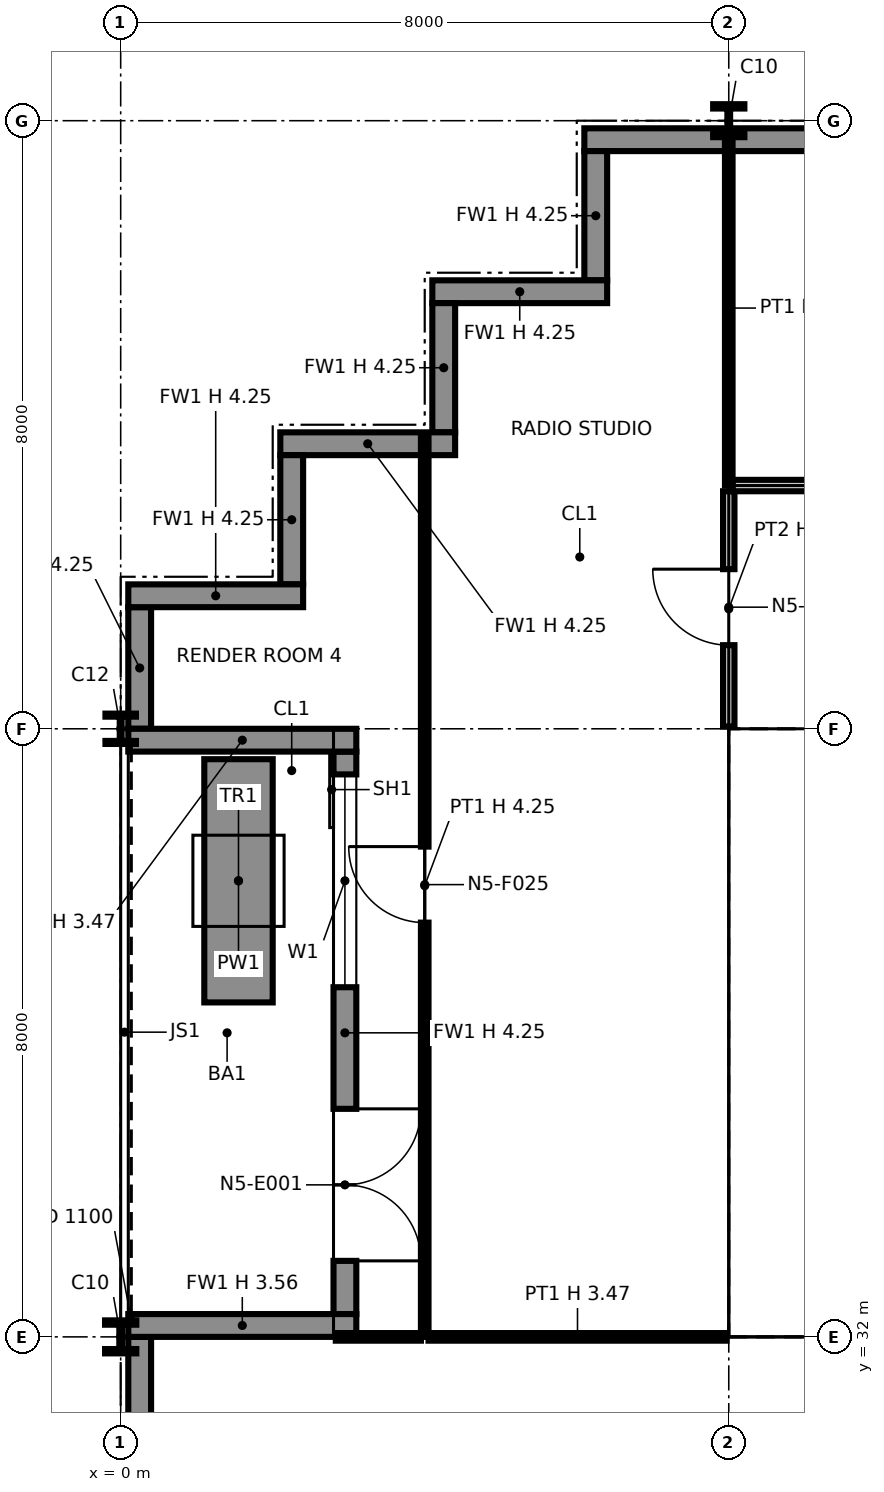
"""IFC4 building model, lengths in metres.
Left out: names, types, materials, properties, quantities, classifications, styles, units other than length and angle.
Written with IfcOpenShell. Run it as: python <this file> out.ifc"""

import sys

from ifc_helpers import new_model, si_unit, direction, frame, frame_2d, origin, origin_2d, place, context, subcontext, project, spatial, polyline, rectangle, i_section, outline, extrude, element, fill, save


model = new_model("IFC4")
c1 = context("Model", 3, precision=1e-05, world=origin(), true_north=direction((0.0, 1.0)))
c2 = subcontext(c1, "Body", "Model", "MODEL_VIEW")
j1 = project(units=[si_unit("LENGTHUNIT", "METRE"), si_unit("PLANEANGLEUNIT", "RADIAN")], contexts=[c1])
p1 = place(None, origin())
s1 = spatial("IfcSite", under=j1, at=p1, CompositionType="ELEMENT")
p2 = place(p1, origin())
s2 = spatial("IfcBuilding", under=s1, at=p2, CompositionType="ELEMENT")
p3 = place(p2, frame((0.0, 0.0, 87.6)))
s3 = spatial("IfcBuildingStorey", under=s2, at=p3, CompositionType="ELEMENT", Elevation=87.6)
p4 = place(p3, frame((0.0, 32.0, 0.0), z_axis=(0.0, 0.0, 1.0), x_axis=(1.0, 0.0, 0.0)))
e1 = element("IfcColumn", 1, at=p4, inside=s3, PredefinedType="COLUMN", context=c2, shape_type="SweptSolid", body=[
    extrude(i_section(OverallWidth=0.411, OverallDepth=0.434, WebThickness=0.036, FlangeThickness=0.057, at=origin_2d()), origin(), (0.0, 0.0, 1.0), 4.25),
])
p5 = place(p3, frame((0.0, 40.0, 0.0), z_axis=(0.0, 0.0, 1.0), x_axis=(1.0, 0.0, 0.0)))
e2 = element("IfcColumn", 2, at=p5, inside=s3, PredefinedType="COLUMN", context=c2, shape_type="SweptSolid", body=[
    extrude(i_section(OverallWidth=0.401, OverallDepth=0.399, WebThickness=0.025, FlangeThickness=0.04, at=origin_2d()), origin(), (0.0, 0.0, 1.0), 4.25),
])
for number, where, z_axis, x_axis in (
    (3, (8.0, 32.0, 0.0), (0.0, 0.0, 1.0), (1.0, 0.0, 0.0)),
    (4, (8.0, 40.0, 0.0), (0.0, 0.0, 1.0), (1.0, 0.0, 0.0)),
):
    element("IfcColumn", number, at=place(p3, frame(where, z_axis=z_axis, x_axis=x_axis)), inside=s3, PredefinedType="COLUMN", context=c2, shape_type="SweptSolid", body=[
        extrude(i_section(OverallWidth=0.394, OverallDepth=0.376, WebThickness=0.017, FlangeThickness=0.028, at=origin_2d()), origin(), (0.0, 0.0, 1.0), 4.25),
    ])
p6 = place(p3, frame((8.0, 48.0, 0.0), z_axis=(0.0, 0.0, 1.0), x_axis=(1.0, 0.0, 0.0)))
e5 = element("IfcColumn", 5, at=p6, inside=s3, PredefinedType="COLUMN", context=c2, shape_type="SweptSolid", body=[
    extrude(i_section(OverallWidth=0.411, OverallDepth=0.434, WebThickness=0.036, FlangeThickness=0.057, at=origin_2d()), origin(), (0.0, 0.0, 1.0), 4.25),
])
p7 = place(p3, frame((0.25, 41.6, 0.0), z_axis=(0.0, 0.0, 1.0), x_axis=(0.0, -1.0, 0.0)))
e6 = element("IfcWall", 6, at=p7, inside=s3, PredefinedType="SOLIDWALL", context=c2, shape_type="SweptSolid", body=[
    extrude(rectangle(XDim=1.6, YDim=0.3, at=frame_2d((0.8, 0.0))), origin(), (0.0, 0.0, 1.0), 4.25),
])
p8 = place(p3, frame((2.95, 39.7, 0.0), z_axis=(0.0, 0.0, 1.0), x_axis=(0.0, -1.0, 0.0)))
e7 = element("IfcWall", 7, at=p8, inside=s3, PredefinedType="SOLIDWALL", context=c2, shape_type="SweptSolid", body=[
    extrude(rectangle(XDim=7.4, YDim=0.3, at=frame_2d((3.7, 0.0))), origin(), (0.0, 0.0, 1.0), 4.25),
])
p9 = place(p8, frame((0.3, 0.0, 0.9)))
e8 = element("IfcOpeningElement", 8, at=p9, cuts=e7, PredefinedType="OPENING", context=c2, shape_type="SweptSolid", body=[
    extrude(rectangle(XDim=2.8, YDim=2.2, at=frame_2d((1.4, 1.1))), frame((0.0, 0.16, 0.0), z_axis=(0.0, -1.0, 0.0), x_axis=(1.0, 0.0, 0.0)), (0.0, 0.0, 1.0), 0.32),
])
p10 = place(p8, frame((4.7, 0.0, 0.0)))
e9 = element("IfcOpeningElement", 9, at=p10, cuts=e7, PredefinedType="OPENING", context=c2, shape_type="SweptSolid", body=[
    extrude(rectangle(XDim=2.0, YDim=2.4, at=frame_2d((1.0, 1.2))), frame((0.0, 0.16, 0.0), z_axis=(0.0, -1.0, 0.0), x_axis=(1.0, 0.0, 0.0)), (0.0, 0.0, 1.0), 0.32),
])
p11 = place(p3, frame((0.1, 39.85, 0.0), z_axis=(0.0, 0.0, 1.0), x_axis=(1.0, 0.0, 0.0)))
e10 = element("IfcWall", 10, at=p11, inside=s3, PredefinedType="SOLIDWALL", context=c2, shape_type="SweptSolid", body=[
    extrude(rectangle(XDim=3.0, YDim=0.3, at=frame_2d((1.5, 0.0))), origin(), (0.0, 0.0, 1.0), 3.469),
])
p12 = place(p3, frame((0.1, 32.15, 0.0), z_axis=(0.0, 0.0, 1.0), x_axis=(1.0, 0.0, 0.0)))
e11 = element("IfcWall", 11, at=p12, inside=s3, PredefinedType="SOLIDWALL", context=c2, shape_type="SweptSolid", body=[
    extrude(rectangle(XDim=3.0, YDim=0.3, at=frame_2d((1.5, 0.0))), origin(), (0.0, 0.0, 1.0), 3.556),
])
p13 = place(p3, frame((0.25, 32.0, 0.0), z_axis=(0.0, 0.0, 1.0), x_axis=(0.0, -1.0, 0.0)))
e12 = element("IfcWall", 12, at=p13, inside=s3, PredefinedType="SOLIDWALL", context=c2, shape_type="SweptSolid", body=[
    extrude(rectangle(XDim=8.0, YDim=0.3, at=frame_2d((4.0, 0.0))), origin(), (0.0, 0.0, 1.0), 4.25),
])
p14 = place(p3, frame((1.55, 39.6, 0.0), z_axis=(0.0, 0.0, 1.0), x_axis=(0.0, -1.0, 0.0)))
e13 = element("IfcWall", 13, at=p14, inside=s3, PredefinedType="SOLIDWALL", context=c2, shape_type="SweptSolid", body=[
    extrude(rectangle(XDim=3.2, YDim=0.9, at=frame_2d((1.6, 0.0))), origin(), (0.0, 0.0, 1.0), 0.6),
])
p15 = place(p3, frame((16.0, 47.75, 0.0), z_axis=(0.0, 0.0, 1.0), x_axis=(-1.0, 0.0, 0.0)))
e14 = element("IfcWall", 14, at=p15, inside=s3, PredefinedType="SOLIDWALL", context=c2, shape_type="SweptSolid", body=[
    extrude(rectangle(XDim=9.9, YDim=0.3, at=frame_2d((4.95, 0.0))), origin(), (0.0, 0.0, 1.0), 4.25),
])
p16 = place(p3, frame((6.25, 47.6, 0.0), z_axis=(0.0, 0.0, 1.0), x_axis=(0.0, -1.0, 0.0)))
e15 = element("IfcWall", 15, at=p16, inside=s3, PredefinedType="SOLIDWALL", context=c2, shape_type="SweptSolid", body=[
    extrude(rectangle(XDim=1.7, YDim=0.3, at=frame_2d((0.85, 0.0))), origin(), (0.0, 0.0, 1.0), 4.25),
])
p17 = place(p3, frame((6.4, 45.75, 0.0), z_axis=(0.0, 0.0, 1.0), x_axis=(-1.0, 0.0, 0.0)))
e16 = element("IfcWall", 16, at=p17, inside=s3, PredefinedType="SOLIDWALL", context=c2, shape_type="SweptSolid", body=[
    extrude(rectangle(XDim=2.3, YDim=0.3, at=frame_2d((1.15, 0.0))), origin(), (0.0, 0.0, 1.0), 4.25),
])
p18 = place(p3, frame((4.25, 45.6, 0.0), z_axis=(0.0, 0.0, 1.0), x_axis=(0.0, -1.0, 0.0)))
e17 = element("IfcWall", 17, at=p18, inside=s3, PredefinedType="SOLIDWALL", context=c2, shape_type="SweptSolid", body=[
    extrude(rectangle(XDim=1.7, YDim=0.3, at=frame_2d((0.85, 0.0))), origin(), (0.0, 0.0, 1.0), 4.25),
])
p19 = place(p3, frame((4.4, 43.75, 0.0), z_axis=(0.0, 0.0, 1.0), x_axis=(-1.0, 0.0, 0.0)))
e18 = element("IfcWall", 18, at=p19, inside=s3, PredefinedType="SOLIDWALL", context=c2, shape_type="SweptSolid", body=[
    extrude(rectangle(XDim=2.3, YDim=0.3, at=frame_2d((1.15, 0.0))), origin(), (0.0, 0.0, 1.0), 4.25),
])
p20 = place(p3, frame((2.25, 43.6, 0.0), z_axis=(0.0, 0.0, 1.0), x_axis=(0.0, -1.0, 0.0)))
e19 = element("IfcWall", 19, at=p20, inside=s3, PredefinedType="SOLIDWALL", context=c2, shape_type="SweptSolid", body=[
    extrude(rectangle(XDim=1.7, YDim=0.3, at=frame_2d((0.85, 0.0))), origin(), (0.0, 0.0, 1.0), 4.25),
])
p21 = place(p3, frame((2.4, 41.75, 0.0), z_axis=(0.0, 0.0, 1.0), x_axis=(-1.0, 0.0, 0.0)))
e20 = element("IfcWall", 20, at=p21, inside=s3, PredefinedType="SOLIDWALL", context=c2, shape_type="SweptSolid", body=[
    extrude(rectangle(XDim=2.3, YDim=0.3, at=frame_2d((1.15, 0.0))), origin(), (0.0, 0.0, 1.0), 4.25),
])
p22 = place(p3, frame((8.65, 32.75, 0.0), z_axis=(0.0, 0.0, 1.0), x_axis=(1.0, 0.0, 0.0)))
e21 = element("IfcWall", 21, at=p22, inside=s3, PredefinedType="PARTITIONING", context=c2, shape_type="SweptSolid", body=[
    extrude(outline(polyline([(0.0, 0.0), (14.7, 0.0), (14.7, 4.25), (7.469, 4.25), (7.469, 3.632), (7.231, 3.632), (7.23, 4.25), (0.0, 4.25), (0.0, 0.0)])), frame((0.0, 0.1, 0.0), z_axis=(0.0, -1.0, 0.0), x_axis=(1.0, 0.0, 0.0)), (0.0, 0.0, 1.0), 0.2),
])
p23 = place(p22, frame((4.05, 0.0, 0.0)))
e22 = element("IfcOpeningElement", 22, at=p23, cuts=e21, PredefinedType="OPENING", context=c2, shape_type="SweptSolid", body=[
    extrude(rectangle(XDim=1.8, YDim=2.1, at=frame_2d((0.9, 1.05))), frame((0.0, 0.11, 0.0), z_axis=(0.0, -1.0, 0.0), x_axis=(1.0, 0.0, 0.0)), (0.0, 0.0, 1.0), 0.22),
])
p24 = place(p22, frame((8.35, 0.0, 0.0)))
e23 = element("IfcOpeningElement", 23, at=p24, cuts=e21, PredefinedType="OPENING", context=c2, shape_type="SweptSolid", body=[
    extrude(rectangle(XDim=1.4, YDim=2.1, at=frame_2d((0.7, 1.05))), frame((0.0, 0.11, 0.0), z_axis=(0.0, -1.0, 0.0), x_axis=(1.0, 0.0, 0.0)), (0.0, 0.0, 1.0), 0.22),
])
p25 = place(p22, frame((10.85, 0.0, 0.0)))
e24 = element("IfcOpeningElement", 24, at=p25, cuts=e21, PredefinedType="OPENING", context=c2, shape_type="SweptSolid", body=[
    extrude(rectangle(XDim=1.4, YDim=2.1, at=frame_2d((0.7, 1.05))), frame((0.0, 0.11, 0.0), z_axis=(0.0, -1.0, 0.0), x_axis=(1.0, 0.0, 0.0)), (0.0, 0.0, 1.0), 0.22),
])
p26 = place(p3, frame((8.75, 32.85, 0.0), z_axis=(0.0, 0.0, 1.0), x_axis=(0.0, 1.0, 0.0)))
e25 = element("IfcWall", 25, at=p26, inside=s3, PredefinedType="PARTITIONING", context=c2, shape_type="SweptSolid", body=[
    extrude(outline(polyline([(0.0, 0.0), (6.3, 0.0), (6.3, 4.25), (3.231, 4.25), (3.23, 3.789), (3.07, 3.789), (3.069, 4.25), (0.0, 4.25), (0.0, 0.0)])), frame((0.0, 0.1, 0.0), z_axis=(0.0, -1.0, 0.0), x_axis=(1.0, 0.0, 0.0)), (0.0, 0.0, 1.0), 0.2),
])
p27 = place(p3, frame((8.65, 39.25, 0.0), z_axis=(0.0, 0.0, 1.0), x_axis=(1.0, 0.0, 0.0)))
e26 = element("IfcWall", 26, at=p27, inside=s3, PredefinedType="PARTITIONING", context=c2, shape_type="SweptSolid", body=[
    extrude(outline(polyline([(0.0, 0.0), (14.7, 0.0), (14.7, 4.25), (7.469, 4.25), (7.469, 3.632), (7.231, 3.632), (7.23, 4.25), (0.0, 4.25), (0.0, 0.0)])), frame((0.0, 0.1, 0.0), z_axis=(0.0, -1.0, 0.0), x_axis=(1.0, 0.0, 0.0)), (0.0, 0.0, 1.0), 0.2),
])
p28 = place(p3, frame((8.85, 36.075, 0.0), z_axis=(0.0, 0.0, 1.0), x_axis=(1.0, 0.0, 0.0)))
e27 = element("IfcWall", 27, at=p28, inside=s3, PredefinedType="PARTITIONING", context=c2, shape_type="SweptSolid", body=[
    extrude(rectangle(XDim=7.45, YDim=0.15, at=frame_2d((3.725, 0.0))), origin(), (0.0, 0.0, 1.0), 3.632),
])
p29 = place(p28, frame((0.75, 0.0, 0.0)))
e28 = element("IfcOpeningElement", 28, at=p29, cuts=e27, PredefinedType="OPENING", context=c2, shape_type="SweptSolid", body=[
    extrude(rectangle(XDim=0.8, YDim=2.1, at=frame_2d((0.4, 1.05))), frame((0.0, 0.085, 0.0), z_axis=(0.0, -1.0, 0.0), x_axis=(1.0, 0.0, 0.0)), (0.0, 0.0, 1.0), 0.17),
])
p30 = place(p28, frame((2.9, 0.0, 0.0)))
e29 = element("IfcOpeningElement", 29, at=p30, cuts=e27, PredefinedType="OPENING", context=c2, shape_type="SweptSolid", body=[
    extrude(rectangle(XDim=0.8, YDim=2.1, at=frame_2d((0.4, 1.05))), frame((0.0, 0.085, 0.0), z_axis=(0.0, -1.0, 0.0), x_axis=(1.0, 0.0, 0.0)), (0.0, 0.0, 1.0), 0.17),
])
p31 = place(p28, frame((5.15, 0.0, 0.0)))
e30 = element("IfcOpeningElement", 30, at=p31, cuts=e27, PredefinedType="OPENING", context=c2, shape_type="SweptSolid", body=[
    extrude(rectangle(XDim=1.0, YDim=2.1, at=frame_2d((0.5, 1.05))), frame((0.0, 0.085, 0.0), z_axis=(0.0, -1.0, 0.0), x_axis=(1.0, 0.0, 0.0)), (0.0, 0.0, 1.0), 0.17),
])
p32 = place(p3, frame((2.83, 32.0, 0.0), z_axis=(0.0, 0.0, 1.0), x_axis=(1.0, 0.0, 0.0)))
e31 = element("IfcWall", 31, at=p32, inside=s3, PredefinedType="PARTITIONING", context=c2, shape_type="SweptSolid", body=[
    extrude(rectangle(XDim=1.12, YDim=0.1, at=frame_2d((0.56, 0.0))), origin(), (0.0, 0.0, 1.0), 3.47),
])
p33 = place(p3, frame((4.05, 32.0, 0.0), z_axis=(0.0, 0.0, 1.0), x_axis=(1.0, 0.0, 0.0)))
e32 = element("IfcWall", 32, at=p33, inside=s3, PredefinedType="PARTITIONING", context=c2, shape_type="SweptSolid", body=[
    extrude(rectangle(XDim=3.92, YDim=0.1, at=frame_2d((1.96, 0.0))), origin(), (0.0, 0.0, 1.0), 3.47),
])
p34 = place(p3, frame((4.0, 32.0, 0.0), z_axis=(0.0, 0.0, 1.0), x_axis=(0.0, 1.0, 0.0)))
e33 = element("IfcWall", 33, at=p34, inside=s3, PredefinedType="PARTITIONING", context=c2, shape_type="SweptSolid", body=[
    extrude(outline(polyline([(0.0, 0.0), (11.87, 0.0), (11.87, 4.25), (8.3, 4.25), (8.298, 3.47), (7.702, 3.47), (7.7, 4.25), (4.3, 4.25), (4.298, 3.47), (3.702, 3.47), (3.7, 4.25), (0.0, 4.25), (0.0, 0.0)])), frame((0.0, 0.05, 0.0), z_axis=(0.0, -1.0, 0.0), x_axis=(1.0, 0.0, 0.0)), (0.0, 0.0, 1.0), 0.1),
])
p35 = place(p34, frame((5.45, 0.0, 0.0)))
e34 = element("IfcOpeningElement", 34, at=p35, cuts=e33, PredefinedType="OPENING", context=c2, shape_type="SweptSolid", body=[
    extrude(rectangle(XDim=1.0, YDim=2.1, at=frame_2d((0.5, 1.05))), frame((0.0, 0.06, 0.0), z_axis=(0.0, -1.0, 0.0), x_axis=(1.0, 0.0, 0.0)), (0.0, 0.0, 1.0), 0.12),
])
p36 = place(p3, frame((8.0, 40.03, 0.0), z_axis=(0.0, 0.0, 1.0), x_axis=(0.0, 1.0, 0.0)))
e35 = element("IfcWall", 35, at=p36, inside=s3, PredefinedType="PARTITIONING", context=c2, shape_type="SweptSolid", body=[
    extrude(rectangle(XDim=3.095, YDim=0.15, at=frame_2d((1.547, 0.0))), origin(), (0.0, 0.0, 1.0), 3.47),
])
p37 = place(p36, frame((1.07, 0.0, 0.0)))
e36 = element("IfcOpeningElement", 36, at=p37, cuts=e35, PredefinedType="OPENING", context=c2, shape_type="SweptSolid", body=[
    extrude(rectangle(XDim=1.0, YDim=2.1, at=frame_2d((0.5, 1.05))), frame((0.0, 0.085, 0.0), z_axis=(0.0, -1.0, 0.0), x_axis=(1.0, 0.0, 0.0)), (0.0, 0.0, 1.0), 0.17),
])
p38 = place(p3, frame((8.05, 43.2, 0.0), z_axis=(0.0, 0.0, 1.0), x_axis=(1.0, 0.0, 0.0)))
e37 = element("IfcWall", 37, at=p38, inside=s3, PredefinedType="PARTITIONING", context=c2, shape_type="SweptSolid", body=[
    extrude(rectangle(XDim=35.15, YDim=0.15, at=frame_2d((17.575, 0.0))), origin(), (0.0, 0.0, 1.0), 4.25),
])
p39 = place(p38, frame((3.45, 0.0, 0.0)))
e38 = element("IfcOpeningElement", 38, at=p39, cuts=e37, PredefinedType="OPENING", context=c2, shape_type="SweptSolid", body=[
    extrude(rectangle(XDim=1.0, YDim=2.1, at=frame_2d((0.5, 1.05))), frame((0.0, 0.085, 0.0), z_axis=(0.0, -1.0, 0.0), x_axis=(1.0, 0.0, 0.0)), (0.0, 0.0, 1.0), 0.17),
])
p40 = place(p38, frame((11.45, 0.0, 0.0)))
e39 = element("IfcOpeningElement", 39, at=p40, cuts=e37, PredefinedType="OPENING", context=c2, shape_type="SweptSolid", body=[
    extrude(rectangle(XDim=1.0, YDim=2.1, at=frame_2d((0.5, 1.05))), frame((0.0, 0.085, 0.0), z_axis=(0.0, -1.0, 0.0), x_axis=(1.0, 0.0, 0.0)), (0.0, 0.0, 1.0), 0.17),
])
p41 = place(p38, frame((19.45, 0.0, 0.0)))
e40 = element("IfcOpeningElement", 40, at=p41, cuts=e37, PredefinedType="OPENING", context=c2, shape_type="SweptSolid", body=[
    extrude(rectangle(XDim=1.0, YDim=2.1, at=frame_2d((0.5, 1.05))), frame((0.0, 0.085, 0.0), z_axis=(0.0, -1.0, 0.0), x_axis=(1.0, 0.0, 0.0)), (0.0, 0.0, 1.0), 0.17),
])
p42 = place(p38, frame((29.45, 0.0, 0.0)))
e41 = element("IfcOpeningElement", 41, at=p42, cuts=e37, PredefinedType="OPENING", context=c2, shape_type="SweptSolid", body=[
    extrude(rectangle(XDim=1.0, YDim=2.1, at=frame_2d((0.5, 1.05))), frame((0.0, 0.085, 0.0), z_axis=(0.0, -1.0, 0.0), x_axis=(1.0, 0.0, 0.0)), (0.0, 0.0, 1.0), 0.17),
])
p43 = place(p3, frame((8.0, 43.2, 0.0), z_axis=(0.0, 0.0, 1.0), x_axis=(0.0, 1.0, 0.0)))
e42 = element("IfcWall", 42, at=p43, inside=s3, PredefinedType="PARTITIONING", context=c2, shape_type="SweptSolid", body=[
    extrude(rectangle(XDim=4.67, YDim=0.1, at=frame_2d((2.335, 0.0))), origin(), (0.0, 0.0, 1.0), 3.47),
])
p44 = place(p9, origin())
e43 = element("IfcWindow", 43, at=p44, inside=s3, PartitioningType="SINGLE_PANEL", PredefinedType="WINDOW", context=c2, shape_type="SweptSolid", body=[
    extrude(rectangle(XDim=2.8, YDim=2.2, at=frame_2d((1.4, 1.1))), frame((0.0, 0.03, 0.0), z_axis=(0.0, -1.0, 0.0), x_axis=(1.0, 0.0, 0.0)), (0.0, 0.0, 1.0), 0.06),
])
fill(e8, e43)
p45 = place(p10, origin())
e44 = element("IfcDoor", 44, at=p45, inside=s3, OperationType="DOUBLE_DOOR_SINGLE_SWING", PredefinedType="DOOR", context=c2, shape_type="SweptSolid", body=[
    extrude(rectangle(XDim=2.0, YDim=2.4, at=frame_2d((1.0, 1.2))), frame((0.0, 0.025, 0.0), z_axis=(0.0, -1.0, 0.0), x_axis=(1.0, 0.0, 0.0)), (0.0, 0.0, 1.0), 0.05),
])
fill(e9, e44)
p46 = place(p37, origin())
e45 = element("IfcDoor", 45, at=p46, inside=s3, OperationType="SINGLE_SWING_RIGHT", PredefinedType="DOOR", context=c2, shape_type="SweptSolid", body=[
    extrude(rectangle(XDim=1.0, YDim=2.1, at=frame_2d((0.5, 1.05))), frame((0.0, 0.025, 0.0), z_axis=(0.0, -1.0, 0.0), x_axis=(1.0, 0.0, 0.0)), (0.0, 0.0, 1.0), 0.05),
])
fill(e36, e45)
p47 = place(p35, origin())
e46 = element("IfcDoor", 46, at=p47, inside=s3, OperationType="SINGLE_SWING_RIGHT", PredefinedType="DOOR", context=c2, shape_type="SweptSolid", body=[
    extrude(rectangle(XDim=1.0, YDim=2.1, at=frame_2d((0.5, 1.05))), frame((0.0, 0.025, 0.0), z_axis=(0.0, -1.0, 0.0), x_axis=(1.0, 0.0, 0.0)), (0.0, 0.0, 1.0), 0.05),
])
fill(e34, e46)
save(model, sys.argv[1])
